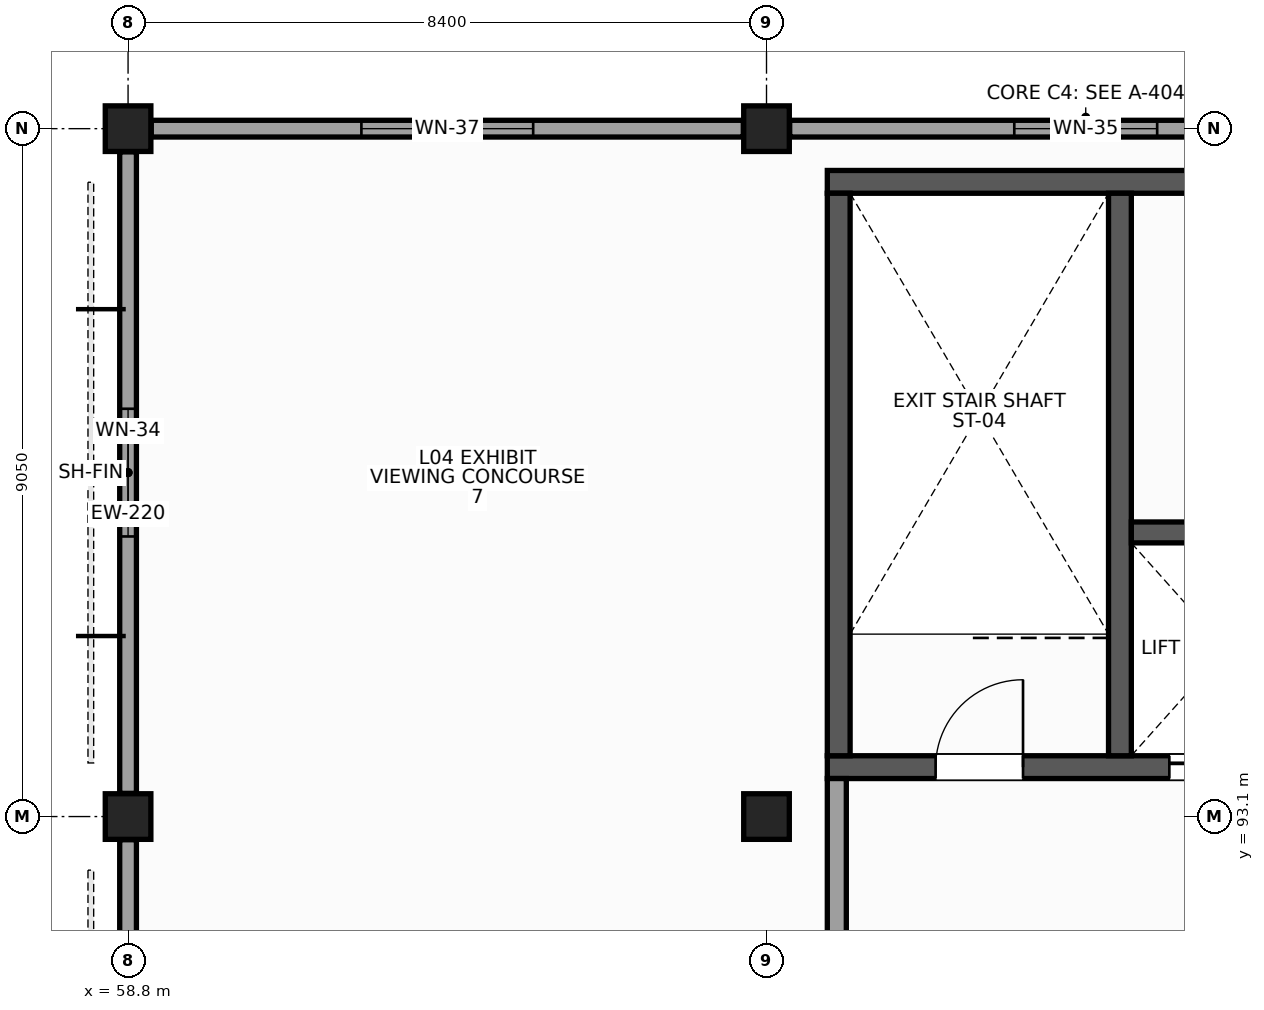
"""IFC4 building model, lengths in metres.
Left out: names, types, materials, properties, quantities, classifications, styles, units other than length and angle.
Written with IfcOpenShell. Run it as: python <this file> out.ifc"""

import sys

from ifc_helpers import new_model, si_unit, direction, frame, frame_2d, origin, origin_2d, place, context, subcontext, project, spatial, rectangle, extrude, element, fill, save


model = new_model("IFC4")
c1 = context("Model", 3, precision=1e-05, world=origin(), true_north=direction((0.0, 1.0)))
c2 = subcontext(c1, "Body", "Model", "MODEL_VIEW")
j1 = project(units=[si_unit("LENGTHUNIT", "METRE"), si_unit("PLANEANGLEUNIT", "RADIAN")], contexts=[c1])
p1 = place(None, origin())
s1 = spatial("IfcSite", under=j1, at=p1, CompositionType="ELEMENT")
p2 = place(p1, origin())
s2 = spatial("IfcBuilding", under=s1, at=p2, CompositionType="ELEMENT")
p3 = place(p2, frame((0.0, 0.0, 20.1)))
s3 = spatial("IfcBuildingStorey", under=s2, at=p3, CompositionType="ELEMENT", Elevation=20.1)
for number, where, z_axis, x_axis in (
    (1, (58.8, 93.1, 0.0), (0.0, 0.0, 1.0), (1.0, 0.0, 0.0)),
    (2, (58.8, 102.15, 0.0), (0.0, 0.0, 1.0), (1.0, 0.0, 0.0)),
    (3, (67.2, 93.1, 0.0), (0.0, 0.0, 1.0), (1.0, 0.0, 0.0)),
    (4, (67.2, 102.15, 0.0), (0.0, 0.0, 1.0), (1.0, 0.0, 0.0)),
):
    element("IfcColumn", number, at=place(p3, frame(where, z_axis=z_axis, x_axis=x_axis)), inside=s3, PredefinedType="COLUMN", context=c2, shape_type="SweptSolid", body=[
        extrude(rectangle(XDim=0.6, YDim=0.6, at=origin_2d()), origin(), (0.0, 0.0, 1.0), 4.5),
    ])
p4 = place(p3, frame((75.295, 102.15, 0.0), z_axis=(0.0, 0.0, 1.0), x_axis=(-1.0, 0.0, 0.0)))
e5 = element("IfcWall", 5, at=p4, inside=s3, PredefinedType="STANDARD", context=c2, shape_type="SweptSolid", body=[
    extrude(rectangle(XDim=7.79, YDim=0.22, at=frame_2d((3.895, 0.0))), origin(), (0.0, 0.0, 1.0), 3.631),
])
p5 = place(p4, frame((2.955, 0.0, 0.95)))
e6 = element("IfcOpeningElement", 6, at=p5, cuts=e5, PredefinedType="OPENING", context=c2, shape_type="SweptSolid", body=[
    extrude(rectangle(XDim=1.88, YDim=2.18, at=frame_2d((0.94, 1.09))), frame((0.0, 0.12, 0.0), z_axis=(0.0, -1.0, 0.0), x_axis=(1.0, 0.0, 0.0)), (0.0, 0.0, 1.0), 0.24),
])
p6 = place(p3, frame((66.895, 102.15, 0.0), z_axis=(0.0, 0.0, 1.0), x_axis=(-1.0, 0.0, 0.0)))
e7 = element("IfcWall", 7, at=p6, inside=s3, PredefinedType="STANDARD", context=c2, shape_type="SweptSolid", body=[
    extrude(rectangle(XDim=7.79, YDim=0.22, at=frame_2d((3.895, 0.0))), origin(), (0.0, 0.0, 1.0), 3.631),
])
p7 = place(p6, frame((2.765, 0.0, 0.95)))
e8 = element("IfcOpeningElement", 8, at=p7, cuts=e7, PredefinedType="OPENING", context=c2, shape_type="SweptSolid", body=[
    extrude(rectangle(XDim=2.26, YDim=2.02, at=frame_2d((1.13, 1.01))), frame((0.0, 0.12, 0.0), z_axis=(0.0, -1.0, 0.0), x_axis=(1.0, 0.0, 0.0)), (0.0, 0.0, 1.0), 0.24),
])
p8 = place(p3, frame((58.8, 101.845, 0.0), z_axis=(0.0, 0.0, 1.0), x_axis=(0.0, -1.0, 0.0)))
e9 = element("IfcWall", 9, at=p8, inside=s3, PredefinedType="STANDARD", context=c2, shape_type="SweptSolid", body=[
    extrude(rectangle(XDim=8.44, YDim=0.22, at=frame_2d((4.22, 0.0))), origin(), (0.0, 0.0, 1.0), 3.631),
])
p9 = place(p8, frame((3.38, 0.0, 0.95)))
e10 = element("IfcOpeningElement", 10, at=p9, cuts=e9, PredefinedType="OPENING", context=c2, shape_type="SweptSolid", body=[
    extrude(rectangle(XDim=1.68, YDim=2.08, at=frame_2d((0.84, 1.04))), frame((0.0, 0.12, 0.0), z_axis=(0.0, -1.0, 0.0), x_axis=(1.0, 0.0, 0.0)), (0.0, 0.0, 1.0), 0.24),
])
p10 = place(p3, frame((58.8, 92.795, 0.0), z_axis=(0.0, 0.0, 1.0), x_axis=(0.0, -1.0, 0.0)))
e11 = element("IfcWall", 11, at=p10, inside=s3, PredefinedType="STANDARD", context=c2, shape_type="SweptSolid", body=[
    extrude(rectangle(XDim=8.44, YDim=0.22, at=frame_2d((4.22, 0.0))), origin(), (0.0, 0.0, 1.0), 3.631),
])
p11 = place(p10, frame((3.18, 0.0, 0.95)))
e12 = element("IfcOpeningElement", 12, at=p11, cuts=e11, PredefinedType="OPENING", context=c2, shape_type="SweptSolid", body=[
    extrude(rectangle(XDim=2.08, YDim=2.28, at=frame_2d((1.04, 1.14))), frame((0.0, 0.12, 0.0), z_axis=(0.0, -1.0, 0.0), x_axis=(1.0, 0.0, 0.0)), (0.0, 0.0, 1.0), 0.24),
])
p12 = place(p3, frame((68.0, 93.75, 0.0), z_axis=(0.0, 0.0, 1.0), x_axis=(1.0, 0.0, 0.0)))
e13 = element("IfcWall", 13, at=p12, inside=s3, PredefinedType="SHEAR", context=c2, shape_type="SweptSolid", body=[
    extrude(rectangle(XDim=6.8, YDim=0.3, at=frame_2d((3.4, 0.0))), origin(), (0.0, 0.0, 1.0), 4.2),
])
p13 = place(p12, frame((1.425, 0.0, 0.0)))
e14 = element("IfcOpeningElement", 14, at=p13, cuts=e13, PredefinedType="OPENING", context=c2, shape_type="SweptSolid", body=[
    extrude(rectangle(XDim=1.15, YDim=2.2, at=frame_2d((0.575, 1.1))), frame((0.0, 0.16, 0.0), z_axis=(0.0, -1.0, 0.0), x_axis=(1.0, 0.0, 0.0)), (0.0, 0.0, 1.0), 0.32),
])
p14 = place(p12, frame((4.5, 0.0, 0.0)))
e15 = element("IfcOpeningElement", 15, at=p14, cuts=e13, PredefinedType="OPENING", context=c2, shape_type="SweptSolid", body=[
    extrude(rectangle(XDim=1.5, YDim=2.3, at=frame_2d((0.75, 1.15))), frame((0.0, 0.16, 0.0), z_axis=(0.0, -1.0, 0.0), x_axis=(1.0, 0.0, 0.0)), (0.0, 0.0, 1.0), 0.32),
])
p15 = place(p3, frame((68.0, 101.45, 0.0), z_axis=(0.0, 0.0, 1.0), x_axis=(1.0, 0.0, 0.0)))
e16 = element("IfcWall", 16, at=p15, inside=s3, PredefinedType="SHEAR", context=c2, shape_type="SweptSolid", body=[
    extrude(rectangle(XDim=6.8, YDim=0.3, at=frame_2d((3.4, 0.0))), origin(), (0.0, 0.0, 1.0), 4.2),
])
for number, where, z_axis, x_axis in (
    (17, (68.15, 93.9, 0.0), (0.0, 0.0, 1.0), (0.0, 1.0, 0.0)),
    (18, (71.85, 93.9, 0.0), (0.0, 0.0, 1.0), (0.0, 1.0, 0.0)),
):
    element("IfcWall", number, at=place(p3, frame(where, z_axis=z_axis, x_axis=x_axis)), inside=s3, PredefinedType="SHEAR", context=c2, shape_type="SweptSolid", body=[
        extrude(rectangle(XDim=7.4, YDim=0.3, at=frame_2d((3.7, 0.0))), origin(), (0.0, 0.0, 1.0), 4.2),
    ])
p16 = place(p3, frame((72.0, 96.838, 0.0), z_axis=(0.0, 0.0, 1.0), x_axis=(1.0, 0.0, 0.0)))
e19 = element("IfcWall", 19, at=p16, inside=s3, PredefinedType="SHEAR", context=c2, shape_type="SweptSolid", body=[
    extrude(rectangle(XDim=2.5, YDim=0.275, at=frame_2d((1.25, 0.0))), origin(), (0.0, 0.0, 1.0), 4.2),
])
p17 = place(p3, frame((68.125, 90.65, 0.0), z_axis=(0.0, 0.0, 1.0), x_axis=(0.0, 1.0, 0.0)))
e20 = element("IfcWall", 20, at=p17, inside=s3, PredefinedType="PARTITIONING", context=c2, shape_type="SweptSolid", body=[
    extrude(rectangle(XDim=2.95, YDim=0.25, at=frame_2d((1.475, 0.0))), origin(), (0.0, 0.0, 1.0), 3.631),
])
p18 = place(p5, origin())
e21 = element("IfcWindow", 21, at=p18, inside=s3, PartitioningType="SINGLE_PANEL", PredefinedType="WINDOW", context=c2, shape_type="SweptSolid", body=[
    extrude(rectangle(XDim=1.88, YDim=2.18, at=frame_2d((0.94, 1.09))), frame((0.0, 0.03, 0.0), z_axis=(0.0, -1.0, 0.0), x_axis=(1.0, 0.0, 0.0)), (0.0, 0.0, 1.0), 0.06),
])
fill(e6, e21)
p19 = place(p7, origin())
e22 = element("IfcWindow", 22, at=p19, inside=s3, PartitioningType="SINGLE_PANEL", PredefinedType="WINDOW", context=c2, shape_type="SweptSolid", body=[
    extrude(rectangle(XDim=2.26, YDim=2.02, at=frame_2d((1.13, 1.01))), frame((0.0, 0.03, 0.0), z_axis=(0.0, -1.0, 0.0), x_axis=(1.0, 0.0, 0.0)), (0.0, 0.0, 1.0), 0.06),
])
fill(e8, e22)
p20 = place(p9, origin())
e23 = element("IfcWindow", 23, at=p20, inside=s3, PartitioningType="SINGLE_PANEL", PredefinedType="WINDOW", context=c2, shape_type="SweptSolid", body=[
    extrude(rectangle(XDim=1.68, YDim=2.08, at=frame_2d((0.84, 1.04))), frame((0.0, 0.03, 0.0), z_axis=(0.0, -1.0, 0.0), x_axis=(1.0, 0.0, 0.0)), (0.0, 0.0, 1.0), 0.06),
])
fill(e10, e23)
p21 = place(p13, origin())
e24 = element("IfcDoor", 24, at=p21, inside=s3, OperationType="SINGLE_SWING_RIGHT", PredefinedType="DOOR", context=c2, shape_type="SweptSolid", body=[
    extrude(rectangle(XDim=1.15, YDim=2.2, at=frame_2d((0.575, 1.1))), frame((0.0, 0.025, 0.0), z_axis=(0.0, -1.0, 0.0), x_axis=(1.0, 0.0, 0.0)), (0.0, 0.0, 1.0), 0.05),
])
fill(e14, e24)
p22 = place(p14, origin())
e25 = element("IfcDoor", 25, at=p22, inside=s3, OperationType="DOUBLE_DOOR_SLIDING", PredefinedType="DOOR", context=c2, shape_type="SweptSolid", body=[
    extrude(rectangle(XDim=1.5, YDim=2.3, at=frame_2d((0.75, 1.15))), frame((0.0, 0.025, 0.0), z_axis=(0.0, -1.0, 0.0), x_axis=(1.0, 0.0, 0.0)), (0.0, 0.0, 1.0), 0.05),
])
fill(e15, e25)
save(model, sys.argv[1])
